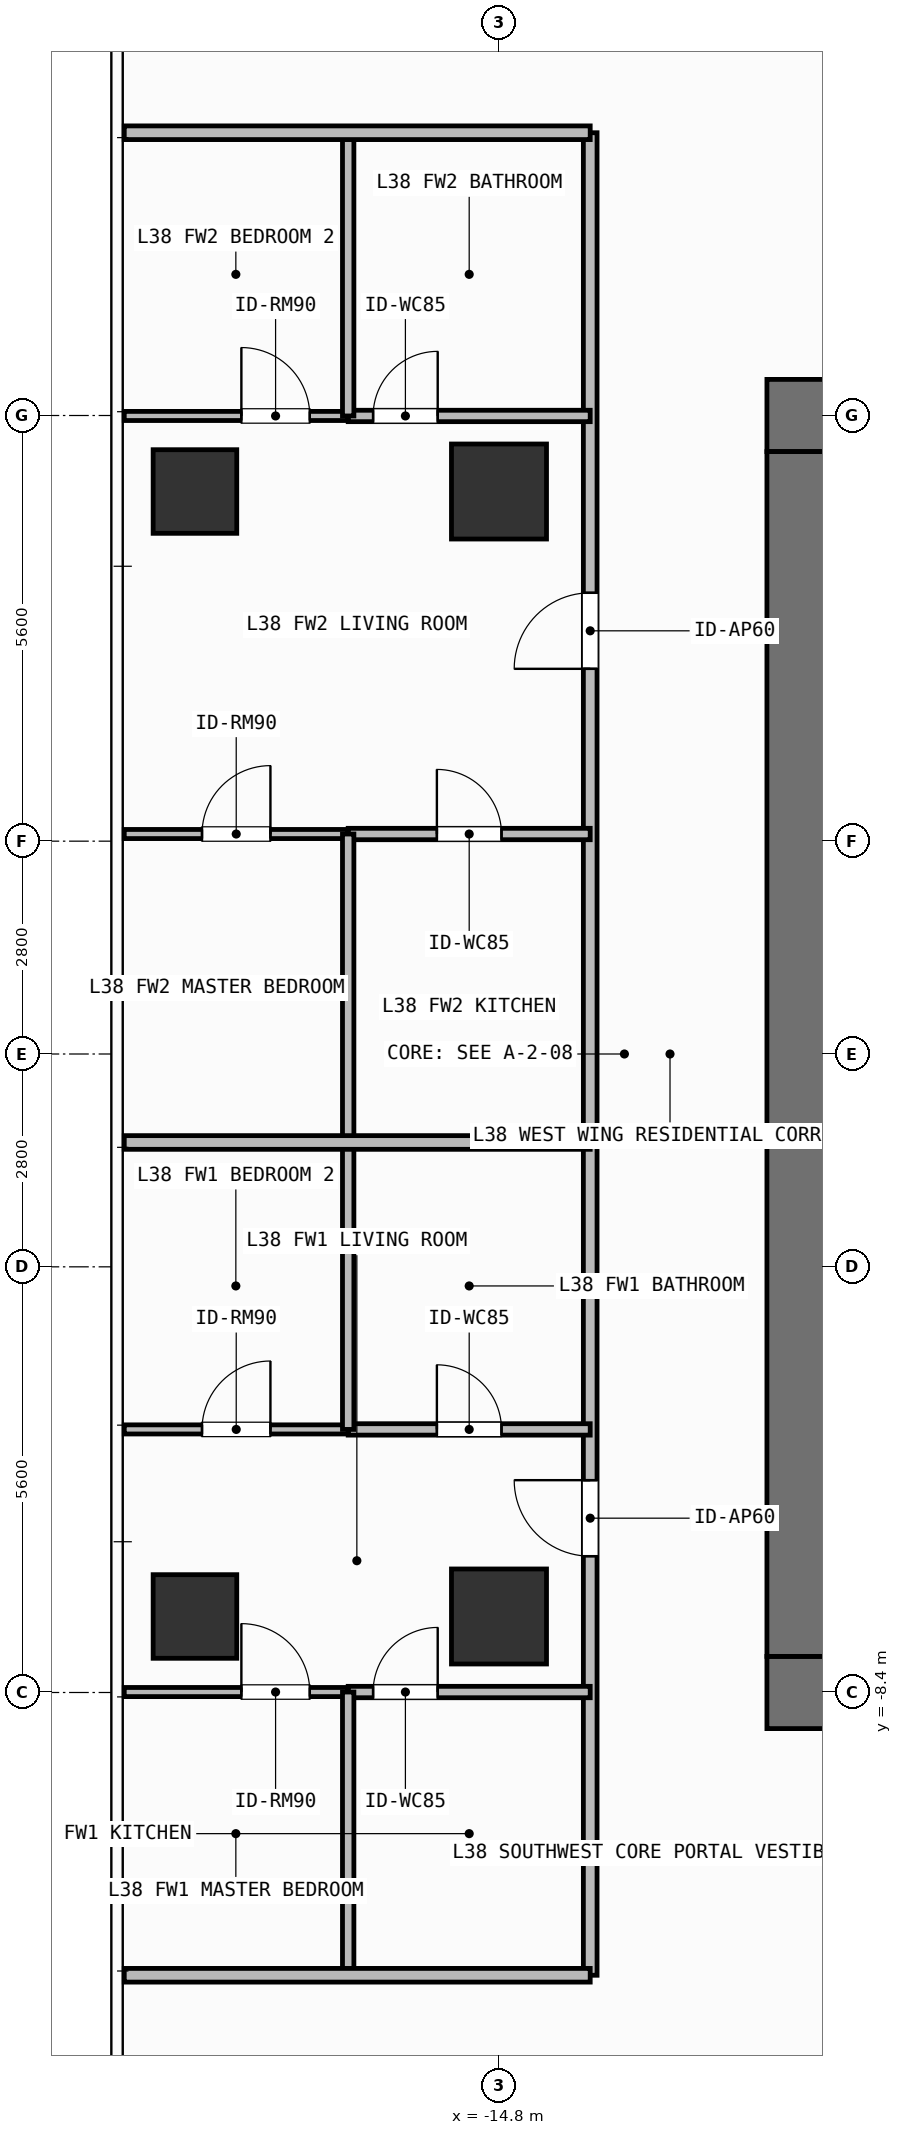
"""IFC4 building model, lengths in metres.
Left out: names, types, materials, properties, quantities, classifications, styles, units other than length and angle.
Written with IfcOpenShell. Run it as: python <this file> out.ifc"""

import sys

from ifc_helpers import new_model, si_unit, direction, frame, frame_2d, origin, origin_2d, place, context, subcontext, project, spatial, rectangle, extrude, element, fill, save


model = new_model("IFC4")
c1 = context("Model", 3, precision=1e-05, world=origin(), true_north=direction((0.0, 1.0)))
c2 = subcontext(c1, "Body", "Model", "MODEL_VIEW")
j1 = project(units=[si_unit("LENGTHUNIT", "METRE"), si_unit("PLANEANGLEUNIT", "RADIAN")], contexts=[c1])
p1 = place(None, origin())
s1 = spatial("IfcSite", under=j1, at=p1, CompositionType="ELEMENT")
p2 = place(p1, origin())
s2 = spatial("IfcBuilding", under=s1, at=p2, CompositionType="ELEMENT")
p3 = place(p2, frame((0.0, 0.0, 152.4)))
s3 = spatial("IfcBuildingStorey", under=s2, at=p3, CompositionType="ELEMENT", Elevation=152.4)
for number, where, z_axis, x_axis in (
    (1, (-11.275, -8.4, 0.0), (0.0, 0.0, 1.0), (1.0, 0.0, 0.0)),
    (2, (-11.275, 8.4, 0.0), (0.0, 0.0, 1.0), (1.0, 0.0, 0.0)),
):
    element("IfcWall", number, at=place(p3, frame(where, z_axis=z_axis, x_axis=x_axis)), inside=s3, PredefinedType="SHEAR", context=c2, shape_type="SweptSolid", body=[
        extrude(rectangle(XDim=1.575, YDim=0.95, at=frame_2d((0.788, 0.0))), origin(), (0.0, 0.0, 1.0), 3.9),
    ])
p4 = place(p3, frame((-10.8, -7.925, 0.0), z_axis=(0.0, 0.0, 1.0), x_axis=(0.0, 1.0, 0.0)))
e3 = element("IfcWall", 3, at=p4, inside=s3, PredefinedType="SHEAR", context=c2, shape_type="SweptSolid", body=[
    extrude(rectangle(XDim=15.85, YDim=0.95, at=frame_2d((7.925, 0.0))), origin(), (0.0, 0.0, 1.0), 3.9),
])
for number, where, z_axis, x_axis in (
    (4, (-14.8, -7.4, 0.0), (0.0, 0.0, 1.0), (1.0, 0.0, 0.0)),
    (5, (-14.8, 7.4, 0.0), (0.0, 0.0, 1.0), (1.0, 0.0, 0.0)),
):
    element("IfcColumn", number, at=place(p3, frame(where, z_axis=z_axis, x_axis=x_axis)), inside=s3, PredefinedType="COLUMN", context=c2, shape_type="SweptSolid", body=[
        extrude(rectangle(XDim=1.25, YDim=1.25, at=origin_2d()), origin(), (0.0, 0.0, 1.0), 3.9),
    ])
for number, where, z_axis, x_axis in (
    (6, (-18.8, -7.4, 0.0), (0.0, 0.0, 1.0), (1.0, 0.0, 0.0)),
    (7, (-18.8, 7.4, 0.0), (0.0, 0.0, 1.0), (1.0, 0.0, 0.0)),
):
    element("IfcColumn", number, at=place(p3, frame(where, z_axis=z_axis, x_axis=x_axis)), inside=s3, PredefinedType="COLUMN", context=c2, shape_type="SweptSolid", body=[
        extrude(rectangle(XDim=1.1, YDim=1.1, at=origin_2d()), origin(), (0.0, 0.0, 1.0), 3.9),
    ])
p5 = place(p3, frame((-13.6, -12.12, 0.0), z_axis=(0.0, 0.0, 1.0), x_axis=(0.0, 1.0, 0.0)))
e8 = element("IfcWall", 8, at=p5, inside=s3, PredefinedType="PARTITIONING", context=c2, shape_type="SweptSolid", body=[
    extrude(rectangle(XDim=10.956, YDim=0.18, at=frame_2d((5.478, 0.0))), origin(), (0.0, 0.0, 1.0), 3.6),
])
p6 = place(p5, frame((5.513, 0.0, 0.0)))
e9 = element("IfcOpeningElement", 9, at=p6, cuts=e8, PredefinedType="OPENING", context=c2, shape_type="SweptSolid", body=[
    extrude(rectangle(XDim=1.0, YDim=2.2, at=frame_2d((0.5, 1.1))), frame((0.0, 0.1, 0.0), z_axis=(0.0, -1.0, 0.0), x_axis=(1.0, 0.0, 0.0)), (0.0, 0.0, 1.0), 0.2),
])
p7 = place(p3, frame((-16.784, -4.939, 0.0), z_axis=(0.0, 0.0, 1.0), x_axis=(1.0, 0.0, 0.0)))
e10 = element("IfcWall", 10, at=p7, inside=s3, PredefinedType="PARTITIONING", context=c2, shape_type="SweptSolid", body=[
    extrude(rectangle(XDim=3.184, YDim=0.15, at=frame_2d((1.592, 0.0))), origin(), (0.0, 0.0, 1.0), 3.6),
])
p8 = place(p7, frame((1.167, 0.0, 0.0)))
e11 = element("IfcOpeningElement", 11, at=p8, cuts=e10, PredefinedType="OPENING", context=c2, shape_type="SweptSolid", body=[
    extrude(rectangle(XDim=0.85, YDim=2.1, at=frame_2d((0.425, 1.05))), frame((0.0, 0.085, 0.0), z_axis=(0.0, -1.0, 0.0), x_axis=(1.0, 0.0, 0.0)), (0.0, 0.0, 1.0), 0.17),
])
p9 = place(p3, frame((-16.784, -8.394, 0.0), z_axis=(0.0, 0.0, 1.0), x_axis=(1.0, 0.0, 0.0)))
e12 = element("IfcWall", 12, at=p9, inside=s3, PredefinedType="PARTITIONING", context=c2, shape_type="SweptSolid", body=[
    extrude(rectangle(XDim=3.184, YDim=0.15, at=frame_2d((1.592, 0.0))), origin(), (0.0, 0.0, 1.0), 3.6),
])
p10 = place(p9, frame((0.328, 0.0, 0.0)))
e13 = element("IfcOpeningElement", 13, at=p10, cuts=e12, PredefinedType="OPENING", context=c2, shape_type="SweptSolid", body=[
    extrude(rectangle(XDim=0.85, YDim=2.1, at=frame_2d((0.425, 1.05))), frame((0.0, 0.085, 0.0), z_axis=(0.0, -1.0, 0.0), x_axis=(1.0, 0.0, 0.0)), (0.0, 0.0, 1.0), 0.17),
])
p11 = place(p3, frame((-19.73, -8.394, 0.0), z_axis=(0.0, 0.0, 1.0), x_axis=(1.0, 0.0, 0.0)))
e14 = element("IfcWall", 14, at=p11, inside=s3, PredefinedType="PARTITIONING", context=c2, shape_type="SweptSolid", body=[
    extrude(rectangle(XDim=2.946, YDim=0.12, at=frame_2d((1.473, 0.0))), origin(), (0.0, 0.0, 1.0), 3.6),
])
p12 = place(p11, frame((1.541, 0.0, 0.0)))
e15 = element("IfcOpeningElement", 15, at=p12, cuts=e14, PredefinedType="OPENING", context=c2, shape_type="SweptSolid", body=[
    extrude(rectangle(XDim=0.9, YDim=2.1, at=frame_2d((0.45, 1.05))), frame((0.0, 0.07, 0.0), z_axis=(0.0, -1.0, 0.0), x_axis=(1.0, 0.0, 0.0)), (0.0, 0.0, 1.0), 0.14),
])
p13 = place(p3, frame((-19.73, -4.939, 0.0), z_axis=(0.0, 0.0, 1.0), x_axis=(1.0, 0.0, 0.0)))
e16 = element("IfcWall", 16, at=p13, inside=s3, PredefinedType="PARTITIONING", context=c2, shape_type="SweptSolid", body=[
    extrude(rectangle(XDim=2.946, YDim=0.12, at=frame_2d((1.473, 0.0))), origin(), (0.0, 0.0, 1.0), 3.6),
])
p14 = place(p13, frame((1.023, 0.0, 0.0)))
e17 = element("IfcOpeningElement", 17, at=p14, cuts=e16, PredefinedType="OPENING", context=c2, shape_type="SweptSolid", body=[
    extrude(rectangle(XDim=0.9, YDim=2.1, at=frame_2d((0.45, 1.05))), frame((0.0, 0.07, 0.0), z_axis=(0.0, -1.0, 0.0), x_axis=(1.0, 0.0, 0.0)), (0.0, 0.0, 1.0), 0.14),
])
p15 = place(p3, frame((-13.6, -1.164, 0.0), z_axis=(0.0, 0.0, 1.0), x_axis=(0.0, 1.0, 0.0)))
e18 = element("IfcWall", 18, at=p15, inside=s3, PredefinedType="PARTITIONING", context=c2, shape_type="SweptSolid", body=[
    extrude(rectangle(XDim=13.284, YDim=0.18, at=frame_2d((6.642, 0.0))), origin(), (0.0, 0.0, 1.0), 3.6),
])
p16 = place(p15, frame((6.231, 0.0, 0.0)))
e19 = element("IfcOpeningElement", 19, at=p16, cuts=e18, PredefinedType="OPENING", context=c2, shape_type="SweptSolid", body=[
    extrude(rectangle(XDim=1.0, YDim=2.2, at=frame_2d((0.5, 1.1))), frame((0.0, 0.1, 0.0), z_axis=(0.0, -1.0, 0.0), x_axis=(1.0, 0.0, 0.0)), (0.0, 0.0, 1.0), 0.2),
])
p17 = place(p3, frame((-16.784, 8.394, 0.0), z_axis=(0.0, 0.0, 1.0), x_axis=(1.0, 0.0, 0.0)))
e20 = element("IfcWall", 20, at=p17, inside=s3, PredefinedType="PARTITIONING", context=c2, shape_type="SweptSolid", body=[
    extrude(rectangle(XDim=3.184, YDim=0.15, at=frame_2d((1.592, 0.0))), origin(), (0.0, 0.0, 1.0), 3.6),
])
p18 = place(p17, frame((0.328, 0.0, 0.0)))
e21 = element("IfcOpeningElement", 21, at=p18, cuts=e20, PredefinedType="OPENING", context=c2, shape_type="SweptSolid", body=[
    extrude(rectangle(XDim=0.85, YDim=2.1, at=frame_2d((0.425, 1.05))), frame((0.0, 0.085, 0.0), z_axis=(0.0, -1.0, 0.0), x_axis=(1.0, 0.0, 0.0)), (0.0, 0.0, 1.0), 0.17),
])
p19 = place(p3, frame((-16.784, 2.894, 0.0), z_axis=(0.0, 0.0, 1.0), x_axis=(1.0, 0.0, 0.0)))
e22 = element("IfcWall", 22, at=p19, inside=s3, PredefinedType="PARTITIONING", context=c2, shape_type="SweptSolid", body=[
    extrude(rectangle(XDim=3.184, YDim=0.15, at=frame_2d((1.592, 0.0))), origin(), (0.0, 0.0, 1.0), 3.6),
])
p20 = place(p19, frame((1.167, 0.0, 0.0)))
e23 = element("IfcOpeningElement", 23, at=p20, cuts=e22, PredefinedType="OPENING", context=c2, shape_type="SweptSolid", body=[
    extrude(rectangle(XDim=0.85, YDim=2.1, at=frame_2d((0.425, 1.05))), frame((0.0, 0.085, 0.0), z_axis=(0.0, -1.0, 0.0), x_axis=(1.0, 0.0, 0.0)), (0.0, 0.0, 1.0), 0.17),
])
p21 = place(p3, frame((-19.73, 2.894, 0.0), z_axis=(0.0, 0.0, 1.0), x_axis=(1.0, 0.0, 0.0)))
e24 = element("IfcWall", 24, at=p21, inside=s3, PredefinedType="PARTITIONING", context=c2, shape_type="SweptSolid", body=[
    extrude(rectangle(XDim=2.946, YDim=0.12, at=frame_2d((1.473, 0.0))), origin(), (0.0, 0.0, 1.0), 3.6),
])
p22 = place(p21, frame((1.023, 0.0, 0.0)))
e25 = element("IfcOpeningElement", 25, at=p22, cuts=e24, PredefinedType="OPENING", context=c2, shape_type="SweptSolid", body=[
    extrude(rectangle(XDim=0.9, YDim=2.1, at=frame_2d((0.45, 1.05))), frame((0.0, 0.07, 0.0), z_axis=(0.0, -1.0, 0.0), x_axis=(1.0, 0.0, 0.0)), (0.0, 0.0, 1.0), 0.14),
])
p23 = place(p3, frame((-19.73, 8.394, 0.0), z_axis=(0.0, 0.0, 1.0), x_axis=(1.0, 0.0, 0.0)))
e26 = element("IfcWall", 26, at=p23, inside=s3, PredefinedType="PARTITIONING", context=c2, shape_type="SweptSolid", body=[
    extrude(rectangle(XDim=2.946, YDim=0.12, at=frame_2d((1.473, 0.0))), origin(), (0.0, 0.0, 1.0), 3.6),
])
p24 = place(p23, frame((1.541, 0.0, 0.0)))
e27 = element("IfcOpeningElement", 27, at=p24, cuts=e26, PredefinedType="OPENING", context=c2, shape_type="SweptSolid", body=[
    extrude(rectangle(XDim=0.9, YDim=2.1, at=frame_2d((0.45, 1.05))), frame((0.0, 0.07, 0.0), z_axis=(0.0, -1.0, 0.0), x_axis=(1.0, 0.0, 0.0)), (0.0, 0.0, 1.0), 0.14),
])
p25 = place(p3, frame((-16.784, -12.12, 0.0), z_axis=(0.0, 0.0, 1.0), x_axis=(0.0, 1.0, 0.0)))
e28 = element("IfcWall", 28, at=p25, inside=s3, PredefinedType="PARTITIONING", context=c2, shape_type="SweptSolid", body=[
    extrude(rectangle(XDim=3.726, YDim=0.15, at=frame_2d((1.863, 0.0))), origin(), (0.0, 0.0, 1.0), 3.6),
])
p26 = place(p3, frame((-16.784, -4.939, 0.0), z_axis=(0.0, 0.0, 1.0), x_axis=(0.0, 1.0, 0.0)))
e29 = element("IfcWall", 29, at=p26, inside=s3, PredefinedType="PARTITIONING", context=c2, shape_type="SweptSolid", body=[
    extrude(rectangle(XDim=3.775, YDim=0.15, at=frame_2d((1.887, 0.0))), origin(), (0.0, 0.0, 1.0), 3.6),
])
p27 = place(p3, frame((-16.784, -1.164, 0.0), z_axis=(0.0, 0.0, 1.0), x_axis=(0.0, 1.0, 0.0)))
e30 = element("IfcWall", 30, at=p27, inside=s3, PredefinedType="PARTITIONING", context=c2, shape_type="SweptSolid", body=[
    extrude(rectangle(XDim=4.058, YDim=0.15, at=frame_2d((2.029, 0.0))), origin(), (0.0, 0.0, 1.0), 3.6),
])
p28 = place(p3, frame((-16.784, 8.394, 0.0), z_axis=(0.0, 0.0, 1.0), x_axis=(0.0, 1.0, 0.0)))
e31 = element("IfcWall", 31, at=p28, inside=s3, PredefinedType="PARTITIONING", context=c2, shape_type="SweptSolid", body=[
    extrude(rectangle(XDim=3.726, YDim=0.15, at=frame_2d((1.863, 0.0))), origin(), (0.0, 0.0, 1.0), 3.6),
])
for number, where, z_axis, x_axis in (
    (32, (-19.73, -1.164, 0.0), (0.0, 0.0, 1.0), (1.0, 0.0, 0.0)),
    (33, (-19.73, -12.12, 0.0), (0.0, 0.0, 1.0), (1.0, 0.0, 0.0)),
    (34, (-19.73, 12.12, 0.0), (0.0, 0.0, 1.0), (1.0, 0.0, 0.0)),
):
    element("IfcWall", number, at=place(p3, frame(where, z_axis=z_axis, x_axis=x_axis)), inside=s3, PredefinedType="PARTITIONING", context=c2, shape_type="SweptSolid", body=[
        extrude(rectangle(XDim=6.13, YDim=0.18, at=frame_2d((3.065, 0.0))), origin(), (0.0, 0.0, 1.0), 3.6),
    ])
p29 = place(p6, origin())
e35 = element("IfcDoor", 35, at=p29, inside=s3, OperationType="SINGLE_SWING_RIGHT", PredefinedType="DOOR", context=c2, shape_type="SweptSolid", body=[
    extrude(rectangle(XDim=1.0, YDim=2.2, at=frame_2d((0.5, 1.1))), frame((0.0, 0.025, 0.0), z_axis=(0.0, -1.0, 0.0), x_axis=(1.0, 0.0, 0.0)), (0.0, 0.0, 1.0), 0.05),
])
fill(e9, e35)
p30 = place(p8, origin())
e36 = element("IfcDoor", 36, at=p30, inside=s3, OperationType="SINGLE_SWING_LEFT", PredefinedType="DOOR", context=c2, shape_type="SweptSolid", body=[
    extrude(rectangle(XDim=0.85, YDim=2.1, at=frame_2d((0.425, 1.05))), frame((0.0, 0.025, 0.0), z_axis=(0.0, -1.0, 0.0), x_axis=(1.0, 0.0, 0.0)), (0.0, 0.0, 1.0), 0.05),
])
fill(e11, e36)
p31 = place(p10, origin())
e37 = element("IfcDoor", 37, at=p31, inside=s3, OperationType="SINGLE_SWING_RIGHT", PredefinedType="DOOR", context=c2, shape_type="SweptSolid", body=[
    extrude(rectangle(XDim=0.85, YDim=2.1, at=frame_2d((0.425, 1.05))), frame((0.0, 0.025, 0.0), z_axis=(0.0, -1.0, 0.0), x_axis=(1.0, 0.0, 0.0)), (0.0, 0.0, 1.0), 0.05),
])
fill(e13, e37)
p32 = place(p12, origin())
e38 = element("IfcDoor", 38, at=p32, inside=s3, OperationType="SINGLE_SWING_LEFT", PredefinedType="DOOR", context=c2, shape_type="SweptSolid", body=[
    extrude(rectangle(XDim=0.9, YDim=2.1, at=frame_2d((0.45, 1.05))), frame((0.0, 0.025, 0.0), z_axis=(0.0, -1.0, 0.0), x_axis=(1.0, 0.0, 0.0)), (0.0, 0.0, 1.0), 0.05),
])
fill(e15, e38)
p33 = place(p14, origin())
e39 = element("IfcDoor", 39, at=p33, inside=s3, OperationType="SINGLE_SWING_RIGHT", PredefinedType="DOOR", context=c2, shape_type="SweptSolid", body=[
    extrude(rectangle(XDim=0.9, YDim=2.1, at=frame_2d((0.45, 1.05))), frame((0.0, 0.025, 0.0), z_axis=(0.0, -1.0, 0.0), x_axis=(1.0, 0.0, 0.0)), (0.0, 0.0, 1.0), 0.05),
])
fill(e17, e39)
p34 = place(p16, origin())
e40 = element("IfcDoor", 40, at=p34, inside=s3, OperationType="SINGLE_SWING_LEFT", PredefinedType="DOOR", context=c2, shape_type="SweptSolid", body=[
    extrude(rectangle(XDim=1.0, YDim=2.2, at=frame_2d((0.5, 1.1))), frame((0.0, 0.025, 0.0), z_axis=(0.0, -1.0, 0.0), x_axis=(1.0, 0.0, 0.0)), (0.0, 0.0, 1.0), 0.05),
])
fill(e19, e40)
p35 = place(p18, origin())
e41 = element("IfcDoor", 41, at=p35, inside=s3, OperationType="SINGLE_SWING_RIGHT", PredefinedType="DOOR", context=c2, shape_type="SweptSolid", body=[
    extrude(rectangle(XDim=0.85, YDim=2.1, at=frame_2d((0.425, 1.05))), frame((0.0, 0.025, 0.0), z_axis=(0.0, -1.0, 0.0), x_axis=(1.0, 0.0, 0.0)), (0.0, 0.0, 1.0), 0.05),
])
fill(e21, e41)
p36 = place(p20, origin())
e42 = element("IfcDoor", 42, at=p36, inside=s3, OperationType="SINGLE_SWING_LEFT", PredefinedType="DOOR", context=c2, shape_type="SweptSolid", body=[
    extrude(rectangle(XDim=0.85, YDim=2.1, at=frame_2d((0.425, 1.05))), frame((0.0, 0.025, 0.0), z_axis=(0.0, -1.0, 0.0), x_axis=(1.0, 0.0, 0.0)), (0.0, 0.0, 1.0), 0.05),
])
fill(e23, e42)
p37 = place(p22, origin())
e43 = element("IfcDoor", 43, at=p37, inside=s3, OperationType="SINGLE_SWING_RIGHT", PredefinedType="DOOR", context=c2, shape_type="SweptSolid", body=[
    extrude(rectangle(XDim=0.9, YDim=2.1, at=frame_2d((0.45, 1.05))), frame((0.0, 0.025, 0.0), z_axis=(0.0, -1.0, 0.0), x_axis=(1.0, 0.0, 0.0)), (0.0, 0.0, 1.0), 0.05),
])
fill(e25, e43)
p38 = place(p24, origin())
e44 = element("IfcDoor", 44, at=p38, inside=s3, OperationType="SINGLE_SWING_LEFT", PredefinedType="DOOR", context=c2, shape_type="SweptSolid", body=[
    extrude(rectangle(XDim=0.9, YDim=2.1, at=frame_2d((0.45, 1.05))), frame((0.0, 0.025, 0.0), z_axis=(0.0, -1.0, 0.0), x_axis=(1.0, 0.0, 0.0)), (0.0, 0.0, 1.0), 0.05),
])
fill(e27, e44)
save(model, sys.argv[1])
